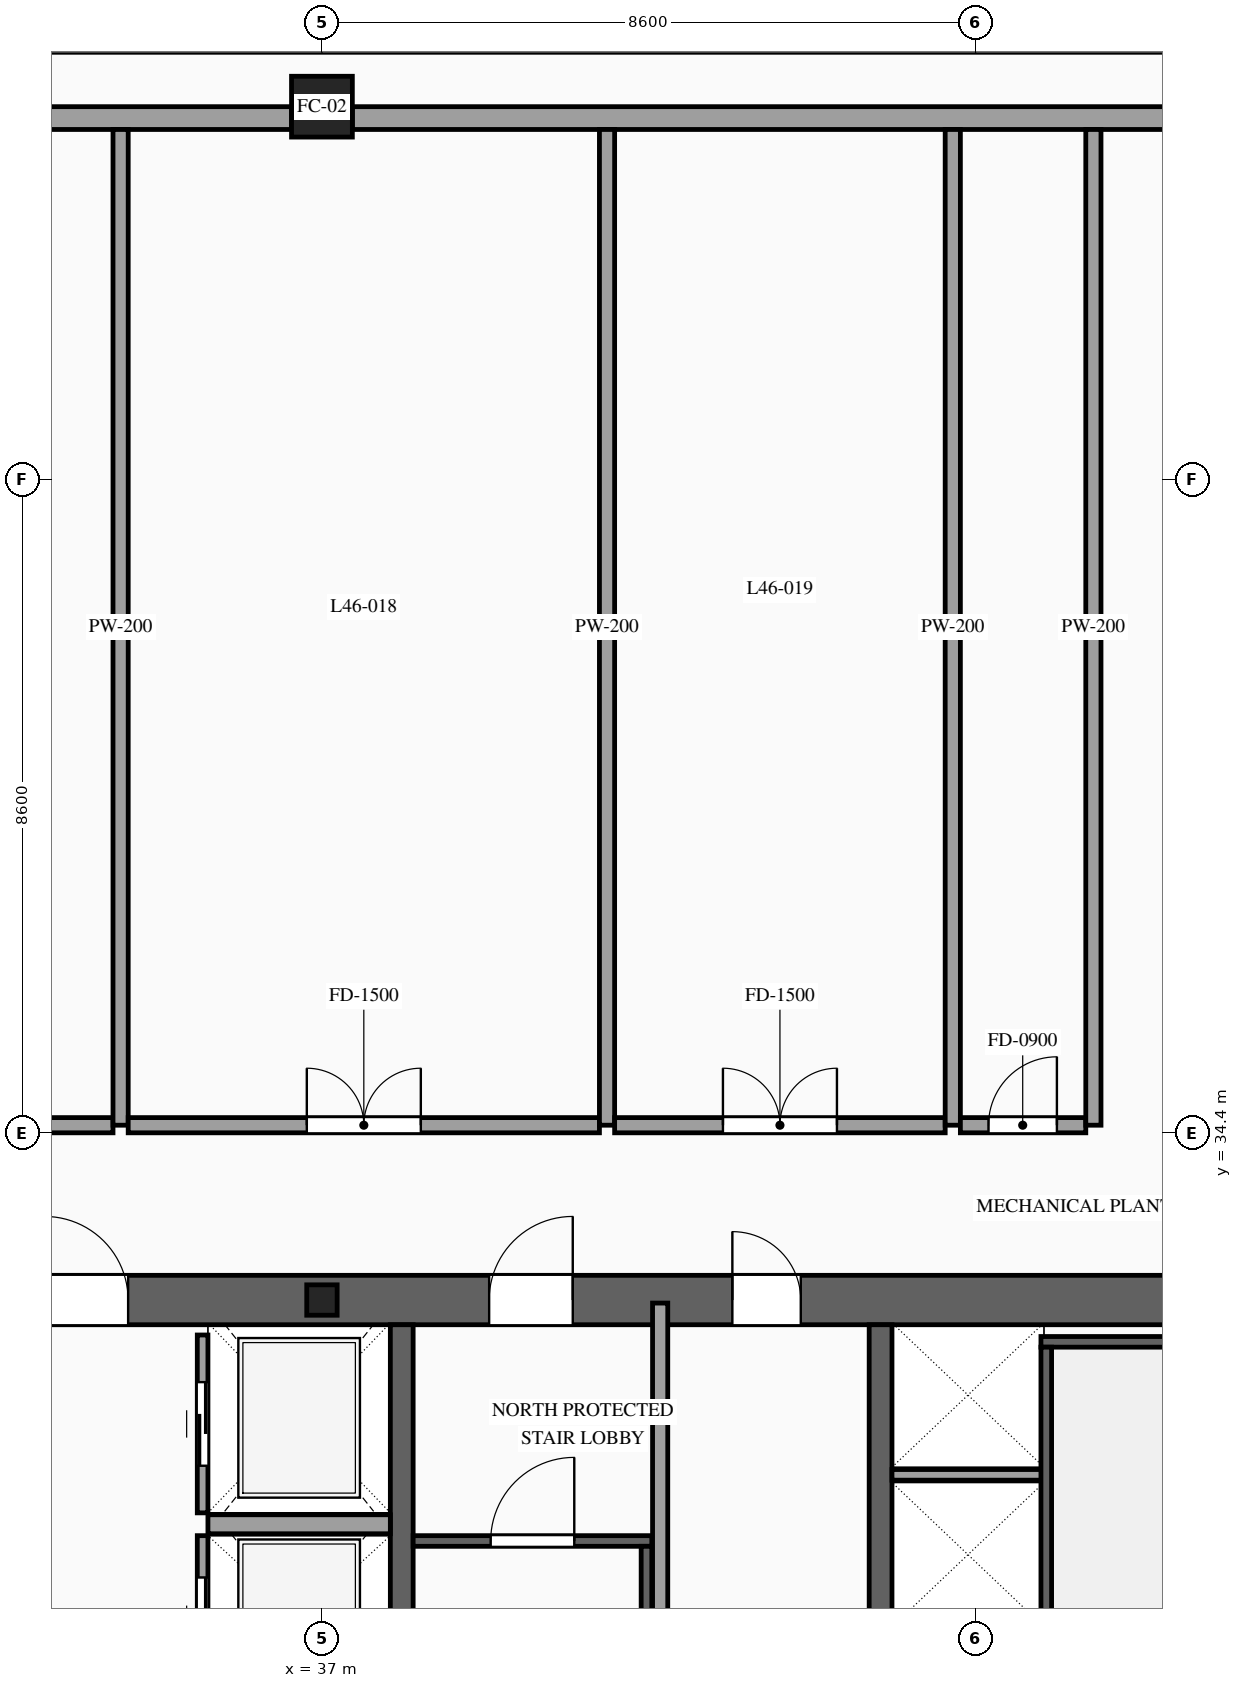
"""IFC4 building model, lengths in metres.
Left out: names, types, materials, properties, quantities, classifications, styles, units other than length and angle.
Written with IfcOpenShell. Run it as: python <this file> out.ifc"""

import sys

from ifc_helpers import new_model, si_unit, direction, frame, frame_2d, origin, origin_2d, place, context, subcontext, project, spatial, rectangle, hollow_rectangle, i_section, extrude, source, transform, mapped, element, fill, save


model = new_model("IFC4")
c1 = context("Model", 3, precision=1e-05, world=origin(), true_north=direction((0.0, 1.0)))
c2 = subcontext(c1, "Body", "Model", "MODEL_VIEW")
j1 = project(units=[si_unit("LENGTHUNIT", "METRE"), si_unit("PLANEANGLEUNIT", "RADIAN")], contexts=[c1])
p1 = place(None, origin())
s1 = spatial("IfcSite", under=j1, at=p1, CompositionType="ELEMENT")
p2 = place(p1, origin())
s2 = spatial("IfcBuilding", under=s1, at=p2, CompositionType="ELEMENT")
p3 = place(p2, frame((0.0, 0.0, 176.4)))
s3 = spatial("IfcBuildingStorey", under=s2, at=p3, CompositionType="ELEMENT", Elevation=176.4)
p4 = place(p3, frame((23.475, 32.2, 0.0), z_axis=(0.0, 0.0, 1.0), x_axis=(1.0, 0.0, 0.0)))
e1 = element("IfcWall", 1, at=p4, inside=s3, PredefinedType="SHEAR", context=c2, shape_type="SweptSolid", body=[
    extrude(rectangle(XDim=27.05, YDim=0.65, at=frame_2d((13.525, 0.0))), origin(), (0.0, 0.0, 1.0), 4.6),
])
p5 = place(p4, frame((4.595, 0.0, 0.0)))
e2 = element("IfcOpeningElement", 2, at=p5, cuts=e1, PredefinedType="OPENING", context=c2, shape_type="SweptSolid", body=[
    extrude(rectangle(XDim=0.9, YDim=2.15, at=frame_2d((0.45, 1.075))), frame((0.0, 0.34, 0.0), z_axis=(0.0, -1.0, 0.0), x_axis=(1.0, 0.0, 0.0)), (0.0, 0.0, 1.0), 0.68),
])
p6 = place(p4, frame((9.875, 0.0, 0.0)))
e3 = element("IfcOpeningElement", 3, at=p6, cuts=e1, PredefinedType="OPENING", context=c2, shape_type="SweptSolid", body=[
    extrude(rectangle(XDim=1.1, YDim=2.2, at=frame_2d((0.55, 1.1))), frame((0.0, 0.34, 0.0), z_axis=(0.0, -1.0, 0.0), x_axis=(1.0, 0.0, 0.0)), (0.0, 0.0, 1.0), 0.68),
])
p7 = place(p4, frame((15.725, 0.0, 0.0)))
e4 = element("IfcOpeningElement", 4, at=p7, cuts=e1, PredefinedType="OPENING", context=c2, shape_type="SweptSolid", body=[
    extrude(rectangle(XDim=1.1, YDim=2.2, at=frame_2d((0.55, 1.1))), frame((0.0, 0.34, 0.0), z_axis=(0.0, -1.0, 0.0), x_axis=(1.0, 0.0, 0.0)), (0.0, 0.0, 1.0), 0.68),
])
p8 = place(p4, frame((18.925, 0.0, 0.0)))
e5 = element("IfcOpeningElement", 5, at=p8, cuts=e1, PredefinedType="OPENING", context=c2, shape_type="SweptSolid", body=[
    extrude(rectangle(XDim=0.9, YDim=2.15, at=frame_2d((0.45, 1.075))), frame((0.0, 0.34, 0.0), z_axis=(0.0, -1.0, 0.0), x_axis=(1.0, 0.0, 0.0)), (0.0, 0.0, 1.0), 0.68),
])
m1 = source(origin(), c2, "Body", "SweptSolid", [
    extrude(rectangle(XDim=12.15, YDim=0.3, at=frame_2d((6.075, 0.0))), origin(), (0.0, 0.0, 1.0), 4.6),
])
for number, where, z_axis, x_axis in (
    (6, (38.05, 19.725, 0.0), (0.0, 0.0, 1.0), (0.0, 1.0, 0.0)),
    (7, (44.35, 19.725, 0.0), (0.0, 0.0, 1.0), (0.0, 1.0, 0.0)),
):
    element("IfcWall", number, at=place(p3, frame(where, z_axis=z_axis, x_axis=x_axis)), inside=s3, PredefinedType="SOLIDWALL", context=c2, shape_type="MappedRepresentation", body=[
        mapped(m1, transform((0.0, 0.0, 0.0), scale=1.0)),
    ])
m2 = source(origin(), c2, "Body", "SweptSolid", [
    extrude(i_section(OverallWidth=0.4, OverallDepth=0.4, WebThickness=0.013, FlangeThickness=0.021, at=origin_2d()), origin(), (0.0, 0.0, 1.0), 4.6),
])
p9 = place(p3, frame((37.0, 32.2, 0.0), z_axis=(0.0, 0.0, 1.0), x_axis=(1.0, 0.0, 0.0)))
e8 = element("IfcColumn", 8, at=p9, inside=s3, PredefinedType="COLUMN", context=c2, shape_type="MappedRepresentation", body=[
    mapped(m2, transform((0.0, 0.0, 0.0), scale=1.0)),
])
m3 = source(origin(), c2, "Body", "SweptSolid", [
    extrude(hollow_rectangle(XDim=0.8, YDim=0.8, WallThickness=0.036, at=origin_2d()), origin(), (0.0, 0.0, 1.0), 4.6),
])
p10 = place(p3, frame((37.0, 47.9, 0.0), z_axis=(0.0, 0.0, 1.0), x_axis=(1.0, 0.0, 0.0)))
e9 = element("IfcColumn", 9, at=p10, inside=s3, PredefinedType="COLUMN", context=c2, shape_type="MappedRepresentation", body=[
    mapped(m3, transform((0.0, 0.0, 0.0), scale=1.0)),
])
m4 = source(origin(), c2, "Body", "SweptSolid", [
    extrude(rectangle(XDim=17.4, YDim=0.3, at=frame_2d((8.7, 0.0))), origin(), (0.0, 0.0, 1.0), 3.935),
])
for number, where, z_axis, x_axis in (
    (10, (19.2, 47.75, 0.0), (0.0, 0.0, 1.0), (1.0, 0.0, 0.0)),
    (11, (37.4, 47.75, 0.0), (0.0, 0.0, 1.0), (1.0, 0.0, 0.0)),
):
    element("IfcWall", number, at=place(p3, frame(where, z_axis=z_axis, x_axis=x_axis)), inside=s3, PredefinedType="SOLIDWALL", context=c2, shape_type="MappedRepresentation", body=[
        mapped(m4, transform((0.0, 0.0, 0.0), scale=1.0)),
    ])
p11 = place(p3, frame((35.43, 26.9, 0.0), z_axis=(0.0, 0.0, 1.0), x_axis=(0.0, 1.0, 0.0)))
e12 = element("IfcWall", 12, at=p11, inside=s3, PredefinedType="SOLIDWALL", context=c2, shape_type="SweptSolid", body=[
    extrude(rectangle(XDim=2.2, YDim=0.14, at=frame_2d((1.1, 0.0))), origin(), (0.0, 0.0, 1.0), 4.38),
])
p12 = place(p11, frame((0.55, 0.0, 0.0)))
e13 = element("IfcOpeningElement", 13, at=p12, cuts=e12, PredefinedType="OPENING", context=c2, shape_type="SweptSolid", body=[
    extrude(rectangle(XDim=1.1, YDim=2.2, at=frame_2d((0.55, 1.1))), frame((0.0, 0.085, 0.0), z_axis=(0.0, -1.0, 0.0), x_axis=(1.0, 0.0, 0.0)), (0.0, 0.0, 1.0), 0.17),
])
p13 = place(p3, frame((35.43, 29.4, 0.0), z_axis=(0.0, 0.0, 1.0), x_axis=(0.0, 1.0, 0.0)))
e14 = element("IfcWall", 14, at=p13, inside=s3, PredefinedType="SOLIDWALL", context=c2, shape_type="SweptSolid", body=[
    extrude(rectangle(XDim=2.34, YDim=0.14, at=frame_2d((1.17, 0.0))), origin(), (0.0, 0.0, 1.0), 4.38),
])
p14 = place(p13, frame((0.62, 0.0, 0.0)))
e15 = element("IfcOpeningElement", 15, at=p14, cuts=e14, PredefinedType="OPENING", context=c2, shape_type="SweptSolid", body=[
    extrude(rectangle(XDim=1.1, YDim=2.2, at=frame_2d((0.55, 1.1))), frame((0.0, 0.085, 0.0), z_axis=(0.0, -1.0, 0.0), x_axis=(1.0, 0.0, 0.0)), (0.0, 0.0, 1.0), 0.17),
])
m5 = source(origin(), c2, "Body", "SweptSolid", [
    extrude(rectangle(XDim=2.4, YDim=0.25, at=frame_2d((1.2, 0.0))), origin(), (0.0, 0.0, 1.0), 4.38),
])
p15 = place(p3, frame((35.5, 29.25, 0.0), z_axis=(0.0, 0.0, 1.0), x_axis=(1.0, 0.0, 0.0)))
e16 = element("IfcWall", 16, at=p15, inside=s3, PredefinedType="SOLIDWALL", context=c2, shape_type="MappedRepresentation", body=[
    mapped(m5, transform((0.0, 0.0, 0.0), scale=1.0)),
])
m6 = source(origin(), c2, "Body", "SweptSolid", [
    extrude(rectangle(XDim=2.0, YDim=0.14, at=frame_2d((1.0, 0.0))), origin(), (0.0, 0.0, 1.0), 4.38),
])
p16 = place(p3, frame((44.5, 29.9, 0.0), z_axis=(0.0, 0.0, 1.0), x_axis=(1.0, 0.0, 0.0)))
e17 = element("IfcWall", 17, at=p16, inside=s3, PredefinedType="SOLIDWALL", context=c2, shape_type="MappedRepresentation", body=[
    mapped(m6, transform((0.0, 0.0, 0.0), scale=1.0)),
])
m7 = source(origin(), c2, "Body", "SweptSolid", [
    extrude(rectangle(XDim=3.28, YDim=0.14, at=frame_2d((1.64, 0.0))), origin(), (0.0, 0.0, 1.0), 4.38),
])
p17 = place(p3, frame((46.46, 31.65, 0.0), z_axis=(0.0, 0.0, 1.0), x_axis=(1.0, 0.0, 0.0)))
e18 = element("IfcWall", 18, at=p17, inside=s3, PredefinedType="SOLIDWALL", context=c2, shape_type="MappedRepresentation", body=[
    mapped(m7, transform((0.0, 0.0, 0.0), scale=1.0)),
])
m8 = source(origin(), c2, "Body", "SweptSolid", [
    extrude(rectangle(XDim=8.94, YDim=0.14, at=frame_2d((4.47, 0.0))), origin(), (0.0, 0.0, 1.0), 4.38),
])
p18 = place(p3, frame((46.53, 22.64, 0.0), z_axis=(0.0, 0.0, 1.0), x_axis=(0.0, 1.0, 0.0)))
e19 = element("IfcWall", 19, at=p18, inside=s3, PredefinedType="SOLIDWALL", context=c2, shape_type="MappedRepresentation", body=[
    mapped(m8, transform((0.0, 0.0, 0.0), scale=1.0)),
])
p19 = place(p3, frame((38.2, 29.03, 0.0), z_axis=(0.0, 0.0, 1.0), x_axis=(1.0, 0.0, 0.0)))
e20 = element("IfcWall", 20, at=p19, inside=s3, PredefinedType="SOLIDWALL", context=c2, shape_type="SweptSolid", body=[
    extrude(rectangle(XDim=3.14, YDim=0.14, at=frame_2d((1.57, 0.0))), origin(), (0.0, 0.0, 1.0), 4.38),
])
p20 = place(p19, frame((1.02, 0.0, 0.0)))
e21 = element("IfcOpeningElement", 21, at=p20, cuts=e20, PredefinedType="OPENING", context=c2, shape_type="SweptSolid", body=[
    extrude(rectangle(XDim=1.1, YDim=2.2, at=frame_2d((0.55, 1.1))), frame((0.0, 0.085, 0.0), z_axis=(0.0, -1.0, 0.0), x_axis=(1.0, 0.0, 0.0)), (0.0, 0.0, 1.0), 0.17),
])
m9 = source(origin(), c2, "Body", "SweptSolid", [
    extrude(rectangle(XDim=8.94, YDim=0.14, at=frame_2d((4.47, 0.0))), origin(), (0.0, 0.0, 1.0), 4.38),
])
p21 = place(p3, frame((41.27, 20.02, 0.0), z_axis=(0.0, 0.0, 1.0), x_axis=(0.0, 1.0, 0.0)))
e22 = element("IfcWall", 22, at=p21, inside=s3, PredefinedType="SOLIDWALL", context=c2, shape_type="MappedRepresentation", body=[
    mapped(m9, transform((0.0, 0.0, 0.0), scale=1.0)),
])
m10 = source(origin(), c2, "Body", "SweptSolid", [
    extrude(rectangle(XDim=12.72, YDim=0.2, at=frame_2d((6.36, 0.0))), origin(), (0.0, 0.0, 1.0), 4.38),
])
p22 = place(p3, frame((41.45, 19.44, 0.0), z_axis=(0.0, 0.0, 1.0), x_axis=(0.0, 1.0, 0.0)))
e23 = element("IfcWall", 23, at=p22, inside=s3, PredefinedType="PARTITIONING", context=c2, shape_type="MappedRepresentation", body=[
    mapped(m10, transform((0.0, 0.0, 0.0), scale=1.0)),
])
p23 = place(p3, frame((28.051, 34.5, 0.0), z_axis=(0.0, 0.0, 1.0), x_axis=(1.0, 0.0, 0.0)))
e24 = element("IfcWall", 24, at=p23, inside=s3, PredefinedType="PARTITIONING", context=c2, shape_type="SweptSolid", body=[
    extrude(rectangle(XDim=6.2, YDim=0.2, at=frame_2d((3.1, 0.0))), origin(), (0.0, 0.0, 1.0), 4.38),
])
p24 = place(p23, frame((2.35, 0.0, 0.0)))
e25 = element("IfcOpeningElement", 25, at=p24, cuts=e24, PredefinedType="OPENING", context=c2, shape_type="SweptSolid", body=[
    extrude(rectangle(XDim=1.5, YDim=2.3, at=frame_2d((0.75, 1.15))), frame((0.0, 0.115, 0.0), z_axis=(0.0, -1.0, 0.0), x_axis=(1.0, 0.0, 0.0)), (0.0, 0.0, 1.0), 0.23),
])
m11 = source(origin(), c2, "Body", "SweptSolid", [
    extrude(rectangle(XDim=13.1, YDim=0.2, at=frame_2d((6.55, 0.0))), origin(), (0.0, 0.0, 1.0), 4.38),
])
p25 = place(p3, frame((34.351, 34.5, 0.0), z_axis=(0.0, 0.0, 1.0), x_axis=(0.0, 1.0, 0.0)))
e26 = element("IfcWall", 26, at=p25, inside=s3, PredefinedType="PARTITIONING", context=c2, shape_type="MappedRepresentation", body=[
    mapped(m11, transform((0.0, 0.0, 0.0), scale=1.0)),
])
p26 = place(p3, frame((34.451, 34.5, 0.0), z_axis=(0.0, 0.0, 1.0), x_axis=(1.0, 0.0, 0.0)))
e27 = element("IfcWall", 27, at=p26, inside=s3, PredefinedType="PARTITIONING", context=c2, shape_type="SweptSolid", body=[
    extrude(rectangle(XDim=6.2, YDim=0.2, at=frame_2d((3.1, 0.0))), origin(), (0.0, 0.0, 1.0), 4.38),
])
p27 = place(p26, frame((2.35, 0.0, 0.0)))
e28 = element("IfcOpeningElement", 28, at=p27, cuts=e27, PredefinedType="OPENING", context=c2, shape_type="SweptSolid", body=[
    extrude(rectangle(XDim=1.5, YDim=2.3, at=frame_2d((0.75, 1.15))), frame((0.0, 0.115, 0.0), z_axis=(0.0, -1.0, 0.0), x_axis=(1.0, 0.0, 0.0)), (0.0, 0.0, 1.0), 0.23),
])
p28 = place(p3, frame((40.751, 34.5, 0.0), z_axis=(0.0, 0.0, 1.0), x_axis=(0.0, 1.0, 0.0)))
e29 = element("IfcWall", 29, at=p28, inside=s3, PredefinedType="PARTITIONING", context=c2, shape_type="MappedRepresentation", body=[
    mapped(m11, transform((0.0, 0.0, 0.0), scale=1.0)),
])
p29 = place(p3, frame((40.851, 34.5, 0.0), z_axis=(0.0, 0.0, 1.0), x_axis=(1.0, 0.0, 0.0)))
e30 = element("IfcWall", 30, at=p29, inside=s3, PredefinedType="PARTITIONING", context=c2, shape_type="SweptSolid", body=[
    extrude(rectangle(XDim=4.349, YDim=0.2, at=frame_2d((2.174, 0.0))), origin(), (0.0, 0.0, 1.0), 4.38),
])
p30 = place(p29, frame((1.425, 0.0, 0.0)))
e31 = element("IfcOpeningElement", 31, at=p30, cuts=e30, PredefinedType="OPENING", context=c2, shape_type="SweptSolid", body=[
    extrude(rectangle(XDim=1.5, YDim=2.3, at=frame_2d((0.75, 1.15))), frame((0.0, 0.115, 0.0), z_axis=(0.0, -1.0, 0.0), x_axis=(1.0, 0.0, 0.0)), (0.0, 0.0, 1.0), 0.23),
])
p31 = place(p3, frame((45.3, 34.5, 0.0), z_axis=(0.0, 0.0, 1.0), x_axis=(0.0, 1.0, 0.0)))
e32 = element("IfcWall", 32, at=p31, inside=s3, PredefinedType="PARTITIONING", context=c2, shape_type="MappedRepresentation", body=[
    mapped(m11, transform((0.0, 0.0, 0.0), scale=1.0)),
])
p32 = place(p3, frame((45.4, 34.5, 0.0), z_axis=(0.0, 0.0, 1.0), x_axis=(1.0, 0.0, 0.0)))
e33 = element("IfcWall", 33, at=p32, inside=s3, PredefinedType="PARTITIONING", context=c2, shape_type="SweptSolid", body=[
    extrude(rectangle(XDim=1.65, YDim=0.2, at=frame_2d((0.825, 0.0))), origin(), (0.0, 0.0, 1.0), 4.38),
])
p33 = place(p32, frame((0.37, 0.0, 0.0)))
e34 = element("IfcOpeningElement", 34, at=p33, cuts=e33, PredefinedType="OPENING", context=c2, shape_type="SweptSolid", body=[
    extrude(rectangle(XDim=0.9, YDim=2.15, at=frame_2d((0.45, 1.075))), frame((0.0, 0.115, 0.0), z_axis=(0.0, -1.0, 0.0), x_axis=(1.0, 0.0, 0.0)), (0.0, 0.0, 1.0), 0.23),
])
p34 = place(p3, frame((47.15, 34.5, 0.0), z_axis=(0.0, 0.0, 1.0), x_axis=(0.0, 1.0, 0.0)))
e35 = element("IfcWall", 35, at=p34, inside=s3, PredefinedType="PARTITIONING", context=c2, shape_type="MappedRepresentation", body=[
    mapped(m11, transform((0.0, 0.0, 0.0), scale=1.0)),
])
m12 = source(origin(), c2, "Body", "SweptSolid", [
    extrude(rectangle(XDim=1.1, YDim=2.2, at=frame_2d((0.55, 1.1))), frame((0.0, 0.025, 0.0), z_axis=(0.0, -1.0, 0.0), x_axis=(1.0, 0.0, 0.0)), (0.0, 0.0, 1.0), 0.05),
])
p35 = place(p12, origin())
e36 = element("IfcDoor", 36, at=p35, inside=s3, OperationType="SLIDING_TO_LEFT", PredefinedType="DOOR", context=c2, shape_type="MappedRepresentation", body=[
    mapped(m12, transform((0.0, 0.0, 0.0), scale=1.0)),
])
fill(e13, e36)
p36 = place(p14, origin())
e37 = element("IfcDoor", 37, at=p36, inside=s3, OperationType="SLIDING_TO_RIGHT", PredefinedType="DOOR", context=c2, shape_type="MappedRepresentation", body=[
    mapped(m12, transform((0.0, 0.0, 0.0), scale=1.0)),
])
fill(e15, e37)
m13 = source(origin(), c2, "Body", "SweptSolid", [
    extrude(rectangle(XDim=1.1, YDim=2.2, at=frame_2d((0.55, 1.1))), frame((0.0, 0.025, 0.0), z_axis=(0.0, -1.0, 0.0), x_axis=(1.0, 0.0, 0.0)), (0.0, 0.0, 1.0), 0.05),
])
p37 = place(p20, origin())
e38 = element("IfcDoor", 38, at=p37, inside=s3, OperationType="SINGLE_SWING_RIGHT", PredefinedType="DOOR", context=c2, shape_type="MappedRepresentation", body=[
    mapped(m13, transform((0.0, 0.0, 0.0), scale=1.0)),
])
fill(e21, e38)
p38 = place(p6, origin())
e39 = element("IfcDoor", 39, at=p38, inside=s3, OperationType="SINGLE_SWING_LEFT", PredefinedType="DOOR", context=c2, shape_type="MappedRepresentation", body=[
    mapped(m13, transform((0.0, 0.0, 0.0), scale=1.0)),
])
fill(e3, e39)
p39 = place(p7, origin())
e40 = element("IfcDoor", 40, at=p39, inside=s3, OperationType="SINGLE_SWING_RIGHT", PredefinedType="DOOR", context=c2, shape_type="MappedRepresentation", body=[
    mapped(m13, transform((0.0, 0.0, 0.0), scale=1.0)),
])
fill(e4, e40)
m14 = source(origin(), c2, "Body", "SweptSolid", [
    extrude(rectangle(XDim=0.9, YDim=2.15, at=frame_2d((0.45, 1.075))), frame((0.0, 0.025, 0.0), z_axis=(0.0, -1.0, 0.0), x_axis=(1.0, 0.0, 0.0)), (0.0, 0.0, 1.0), 0.05),
])
p40 = place(p8, origin())
e41 = element("IfcDoor", 41, at=p40, inside=s3, OperationType="SINGLE_SWING_LEFT", PredefinedType="DOOR", context=c2, shape_type="MappedRepresentation", body=[
    mapped(m14, transform((0.0, 0.0, 0.0), scale=1.0)),
])
fill(e5, e41)
m15 = source(origin(), c2, "Body", "SweptSolid", [
    extrude(rectangle(XDim=1.5, YDim=2.3, at=frame_2d((0.75, 1.15))), frame((0.0, 0.025, 0.0), z_axis=(0.0, -1.0, 0.0), x_axis=(1.0, 0.0, 0.0)), (0.0, 0.0, 1.0), 0.05),
])
p41 = place(p27, origin())
e42 = element("IfcDoor", 42, at=p41, inside=s3, OperationType="DOUBLE_DOOR_SINGLE_SWING", PredefinedType="DOOR", context=c2, shape_type="MappedRepresentation", body=[
    mapped(m15, transform((0.0, 0.0, 0.0), scale=1.0)),
])
fill(e28, e42)
p42 = place(p30, origin())
e43 = element("IfcDoor", 43, at=p42, inside=s3, OperationType="DOUBLE_DOOR_SINGLE_SWING", PredefinedType="DOOR", context=c2, shape_type="MappedRepresentation", body=[
    mapped(m15, transform((0.0, 0.0, 0.0), scale=1.0)),
])
fill(e31, e43)
p43 = place(p33, origin())
e44 = element("IfcDoor", 44, at=p43, inside=s3, OperationType="SINGLE_SWING_RIGHT", PredefinedType="DOOR", context=c2, shape_type="MappedRepresentation", body=[
    mapped(m14, transform((0.0, 0.0, 0.0), scale=1.0)),
])
fill(e34, e44)
save(model, sys.argv[1])
